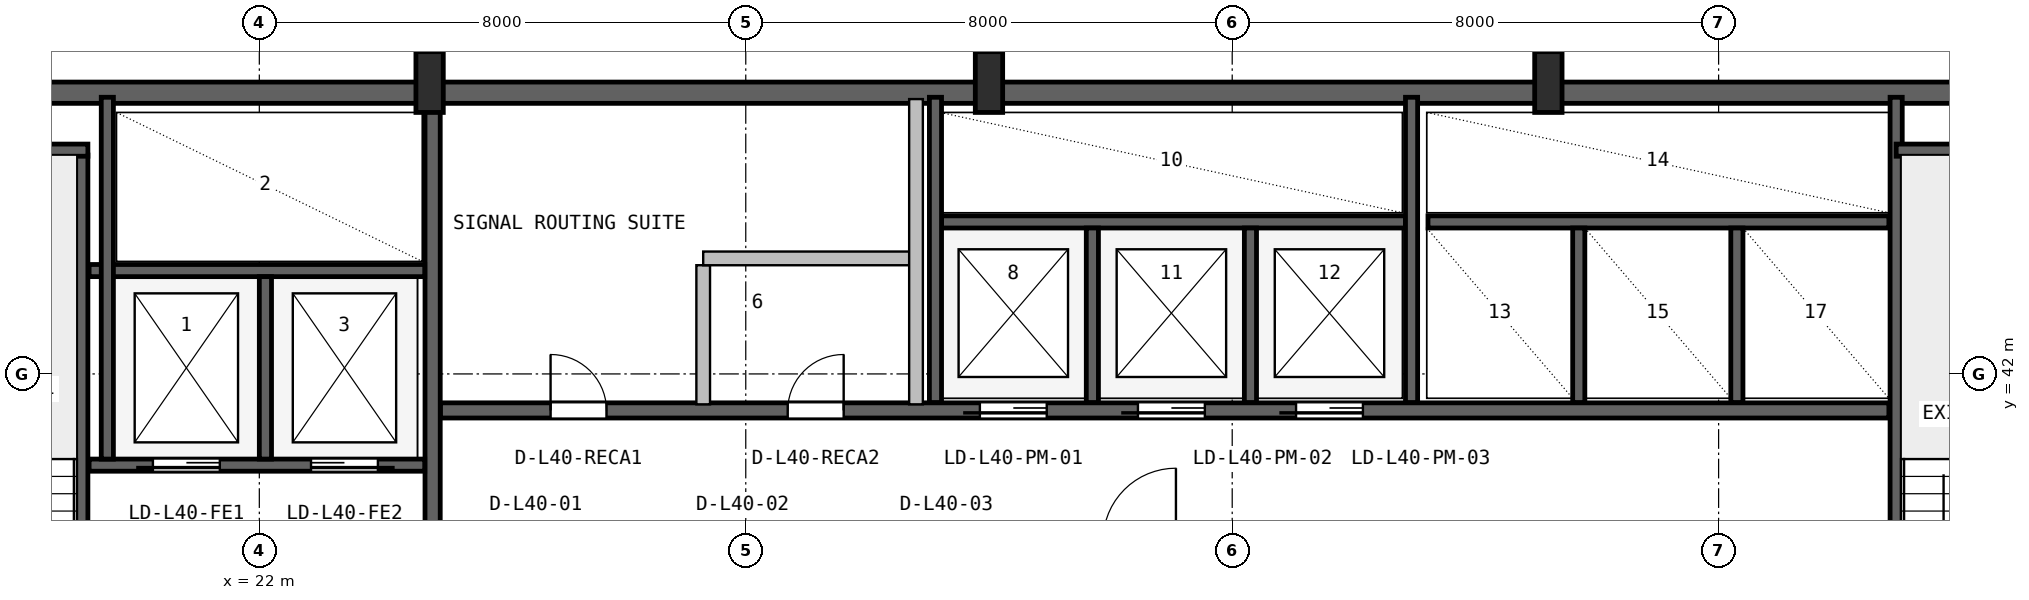
"""IFC4 building model, lengths in metres.
Left out: names, types, materials, properties, quantities, classifications, styles, units other than length and angle.
Written with IfcOpenShell. Run it as: python <this file> out.ifc"""

import sys

from ifc_helpers import new_model, si_unit, direction, frame, frame_2d, origin, origin_2d, place, context, subcontext, project, spatial, rectangle, i_section, extrude, source, transform, mapped, element, fill, save


model = new_model("IFC4")
c1 = context("Model", 3, precision=1e-05, world=origin(), true_north=direction((0.0, 1.0)))
c2 = subcontext(c1, "Body", "Model", "MODEL_VIEW")
j1 = project(units=[si_unit("LENGTHUNIT", "METRE"), si_unit("PLANEANGLEUNIT", "RADIAN")], contexts=[c1])
p1 = place(None, origin())
s1 = spatial("IfcSite", under=j1, at=p1, CompositionType="ELEMENT")
p2 = place(p1, origin())
s2 = spatial("IfcBuilding", under=s1, at=p2, CompositionType="ELEMENT")
p3 = place(p2, frame((0.0, 0.0, 164.8)))
s3 = spatial("IfcBuildingStorey", under=s2, at=p3, CompositionType="ELEMENT", Elevation=164.8)
p4 = place(p3, frame((15.6, 46.625, 0.0), z_axis=(0.0, 0.0, 1.0), x_axis=(1.0, 0.0, 0.0)))
e1 = element("IfcWall", 1, at=p4, inside=s3, PredefinedType="SHEAR", context=c2, shape_type="SweptSolid", body=[
    extrude(rectangle(XDim=36.8, YDim=0.35, at=frame_2d((18.4, 0.0))), origin(), (0.0, 0.0, 1.0), 3.55),
])
m1 = source(origin(), c2, "Body", "SweptSolid", [
    extrude(i_section(OverallWidth=0.45, OverallDepth=1.0, WebThickness=0.016, FlangeThickness=0.03, FilletRadius=0.016, at=origin_2d()), origin(), (0.0, 0.0, 1.0), 3.8),
])
for number, where, z_axis, x_axis in (
    (2, (24.8, 46.8, 0.0), (0.0, 0.0, 1.0), (1.0, 0.0, 0.0)),
    (3, (34.0, 46.8, 0.0), (0.0, 0.0, 1.0), (1.0, 0.0, 0.0)),
    (4, (43.2, 46.8, 0.0), (0.0, 0.0, 1.0), (1.0, 0.0, 0.0)),
):
    element("IfcColumn", number, at=place(p3, frame(where, z_axis=z_axis, x_axis=x_axis)), inside=s3, PredefinedType="COLUMN", context=c2, shape_type="MappedRepresentation", body=[
        mapped(m1, transform((0.0, 0.0, 0.0), x_axis=(1.0, 0.0, 0.0), y_axis=(0.0, 1.0, 0.0), z_axis=(0.0, 0.0, 1.0), scale=1.0)),
    ])
p5 = place(p3, frame((19.08, 35.95, 0.0), z_axis=(0.0, 0.0, 1.0), x_axis=(0.0, 1.0, 0.0)))
e5 = element("IfcWall", 5, at=p5, inside=s3, PredefinedType="SHEAR", context=c2, shape_type="SweptSolid", body=[
    extrude(rectangle(XDim=9.65, YDim=0.2, at=frame_2d((4.825, 0.0))), origin(), (0.0, 0.0, 1.0), 3.55),
])
p6 = place(p5, frame((0.25, 0.0, 0.0)))
e6 = element("IfcOpeningElement", 6, at=p6, cuts=e5, PredefinedType="OPENING", context=c2, shape_type="SweptSolid", body=[
    extrude(rectangle(XDim=0.95, YDim=2.1, at=frame_2d((0.475, 1.05))), frame((0.0, 0.11, 0.0), z_axis=(0.0, -1.0, 0.0), x_axis=(1.0, 0.0, 0.0)), (0.0, 0.0, 1.0), 0.22),
])
p7 = place(p3, frame((15.95, 45.68, 0.0), z_axis=(0.0, 0.0, 1.0), x_axis=(1.0, 0.0, 0.0)))
e7 = element("IfcWall", 7, at=p7, inside=s3, PredefinedType="SHEAR", context=c2, shape_type="SweptSolid", body=[
    extrude(rectangle(XDim=3.23, YDim=0.2, at=frame_2d((1.615, 0.0))), origin(), (0.0, 0.0, 1.0), 3.55),
])
p8 = place(p3, frame((24.85, 36.05, 0.0), z_axis=(0.0, 0.0, 1.0), x_axis=(0.0, 1.0, 0.0)))
e8 = element("IfcWall", 8, at=p8, inside=s3, PredefinedType="SHEAR", context=c2, shape_type="SweptSolid", body=[
    extrude(rectangle(XDim=10.45, YDim=0.25, at=frame_2d((5.225, 0.0))), origin(), (0.0, 0.0, 1.0), 3.55),
])
p9 = place(p3, frame((19.2, 40.5, 0.0), z_axis=(0.0, 0.0, 1.0), x_axis=(1.0, 0.0, 0.0)))
e9 = element("IfcWall", 9, at=p9, inside=s3, PredefinedType="SHEAR", context=c2, shape_type="SweptSolid", body=[
    extrude(rectangle(XDim=5.52, YDim=0.2, at=frame_2d((2.76, 0.0))), origin(), (0.0, 0.0, 1.0), 3.55),
])
p10 = place(p9, frame((1.05, 0.0, 0.0)))
e10 = element("IfcOpeningElement", 10, at=p10, cuts=e9, PredefinedType="OPENING", context=c2, shape_type="SweptSolid", body=[
    extrude(rectangle(XDim=1.1, YDim=2.18, at=frame_2d((0.55, 1.09))), frame((0.0, 0.11, 0.0), z_axis=(0.0, -1.0, 0.0), x_axis=(1.0, 0.0, 0.0)), (0.0, 0.0, 1.0), 0.22),
])
p11 = place(p9, frame((3.65, 0.0, 0.0)))
e11 = element("IfcOpeningElement", 11, at=p11, cuts=e9, PredefinedType="OPENING", context=c2, shape_type="SweptSolid", body=[
    extrude(rectangle(XDim=1.1, YDim=2.18, at=frame_2d((0.55, 1.09))), frame((0.0, 0.11, 0.0), z_axis=(0.0, -1.0, 0.0), x_axis=(1.0, 0.0, 0.0)), (0.0, 0.0, 1.0), 0.22),
])
p12 = place(p3, frame((19.2, 43.7, 0.0), z_axis=(0.0, 0.0, 1.0), x_axis=(1.0, 0.0, 0.0)))
e12 = element("IfcWall", 12, at=p12, inside=s3, PredefinedType="SHEAR", context=c2, shape_type="SweptSolid", body=[
    extrude(rectangle(XDim=5.52, YDim=0.2, at=frame_2d((2.76, 0.0))), origin(), (0.0, 0.0, 1.0), 3.55),
])
p13 = place(p3, frame((22.1, 40.6, 0.0), z_axis=(0.0, 0.0, 1.0), x_axis=(0.0, 1.0, 0.0)))
e13 = element("IfcWall", 13, at=p13, inside=s3, PredefinedType="SHEAR", context=c2, shape_type="SweptSolid", body=[
    extrude(rectangle(XDim=3.0, YDim=0.2, at=frame_2d((1.5, 0.0))), origin(), (0.0, 0.0, 1.0), 3.55),
])
p14 = place(p3, frame((19.5, 40.6, 0.0), z_axis=(0.0, 0.0, 1.0), x_axis=(0.0, 1.0, 0.0)))
e14 = element("IfcWall", 14, at=p14, inside=s3, PredefinedType="SHEAR", context=c2, shape_type="SweptSolid", body=[
    extrude(rectangle(XDim=5.95, YDim=0.2, at=frame_2d((2.975, 0.0))), origin(), (0.0, 0.0, 1.0), 3.55),
])
p15 = place(p3, frame((48.92, 36.05, 0.0), z_axis=(0.0, 0.0, 1.0), x_axis=(0.0, 1.0, 0.0)))
e15 = element("IfcWall", 15, at=p15, inside=s3, PredefinedType="SHEAR", context=c2, shape_type="SweptSolid", body=[
    extrude(rectangle(XDim=10.5, YDim=0.2, at=frame_2d((5.25, 0.0))), origin(), (0.0, 0.0, 1.0), 3.55),
])
p16 = place(p3, frame((48.92, 45.68, 0.0), z_axis=(0.0, 0.0, 1.0), x_axis=(1.0, 0.0, 0.0)))
e16 = element("IfcWall", 16, at=p16, inside=s3, PredefinedType="SHEAR", context=c2, shape_type="SweptSolid", body=[
    extrude(rectangle(XDim=3.18, YDim=0.2, at=frame_2d((1.59, 0.0))), origin(), (0.0, 0.0, 1.0), 3.55),
])
p17 = place(p3, frame((24.98, 41.4, 0.0), z_axis=(0.0, 0.0, 1.0), x_axis=(1.0, 0.0, 0.0)))
e17 = element("IfcWall", 17, at=p17, inside=s3, PredefinedType="SHEAR", context=c2, shape_type="SweptSolid", body=[
    extrude(rectangle(XDim=23.82, YDim=0.25, at=frame_2d((11.91, 0.0))), origin(), (0.0, 0.0, 1.0), 3.55),
])
p18 = place(p17, frame((8.87, 0.0, 0.0)))
e18 = element("IfcOpeningElement", 18, at=p18, cuts=e17, PredefinedType="OPENING", context=c2, shape_type="SweptSolid", body=[
    extrude(rectangle(XDim=1.1, YDim=2.18, at=frame_2d((0.55, 1.09))), frame((0.0, 0.135, 0.0), z_axis=(0.0, -1.0, 0.0), x_axis=(1.0, 0.0, 0.0)), (0.0, 0.0, 1.0), 0.27),
])
p19 = place(p17, frame((11.47, 0.0, 0.0)))
e19 = element("IfcOpeningElement", 19, at=p19, cuts=e17, PredefinedType="OPENING", context=c2, shape_type="SweptSolid", body=[
    extrude(rectangle(XDim=1.1, YDim=2.18, at=frame_2d((0.55, 1.09))), frame((0.0, 0.135, 0.0), z_axis=(0.0, -1.0, 0.0), x_axis=(1.0, 0.0, 0.0)), (0.0, 0.0, 1.0), 0.27),
])
p20 = place(p17, frame((14.07, 0.0, 0.0)))
e20 = element("IfcOpeningElement", 20, at=p20, cuts=e17, PredefinedType="OPENING", context=c2, shape_type="SweptSolid", body=[
    extrude(rectangle(XDim=1.1, YDim=2.18, at=frame_2d((0.55, 1.09))), frame((0.0, 0.135, 0.0), z_axis=(0.0, -1.0, 0.0), x_axis=(1.0, 0.0, 0.0)), (0.0, 0.0, 1.0), 0.27),
])
p21 = place(p17, frame((1.81, 0.0, 0.0)))
e21 = element("IfcOpeningElement", 21, at=p21, cuts=e17, PredefinedType="OPENING", context=c2, shape_type="SweptSolid", body=[
    extrude(rectangle(XDim=0.92, YDim=2.08, at=frame_2d((0.46, 1.04))), frame((0.0, 0.135, 0.0), z_axis=(0.0, -1.0, 0.0), x_axis=(1.0, 0.0, 0.0)), (0.0, 0.0, 1.0), 0.27),
])
p22 = place(p17, frame((5.71, 0.0, 0.0)))
e22 = element("IfcOpeningElement", 22, at=p22, cuts=e17, PredefinedType="OPENING", context=c2, shape_type="SweptSolid", body=[
    extrude(rectangle(XDim=0.92, YDim=2.08, at=frame_2d((0.46, 1.04))), frame((0.0, 0.135, 0.0), z_axis=(0.0, -1.0, 0.0), x_axis=(1.0, 0.0, 0.0)), (0.0, 0.0, 1.0), 0.27),
])
p23 = place(p3, frame((33.22, 44.5, 0.0), z_axis=(0.0, 0.0, 1.0), x_axis=(1.0, 0.0, 0.0)))
e23 = element("IfcWall", 23, at=p23, inside=s3, PredefinedType="SHEAR", context=c2, shape_type="SweptSolid", body=[
    extrude(rectangle(XDim=7.63, YDim=0.2, at=frame_2d((3.815, 0.0))), origin(), (0.0, 0.0, 1.0), 3.55),
])
p24 = place(p3, frame((33.12, 41.53, 0.0), z_axis=(0.0, 0.0, 1.0), x_axis=(0.0, 1.0, 0.0)))
e24 = element("IfcWall", 24, at=p24, inside=s3, PredefinedType="SHEAR", context=c2, shape_type="SweptSolid", body=[
    extrude(rectangle(XDim=5.02, YDim=0.2, at=frame_2d((2.51, 0.0))), origin(), (0.0, 0.0, 1.0), 3.55),
])
for number, where, z_axis, x_axis in (
    (25, (35.7, 41.53, 0.0), (0.0, 0.0, 1.0), (0.0, 1.0, 0.0)),
    (26, (38.3, 41.53, 0.0), (0.0, 0.0, 1.0), (0.0, 1.0, 0.0)),
):
    element("IfcWall", number, at=place(p3, frame(where, z_axis=z_axis, x_axis=x_axis)), inside=s3, PredefinedType="SHEAR", context=c2, shape_type="SweptSolid", body=[
        extrude(rectangle(XDim=2.87, YDim=0.2, at=frame_2d((1.435, 0.0))), origin(), (0.0, 0.0, 1.0), 3.55),
    ])
p25 = place(p3, frame((40.95, 41.53, 0.0), z_axis=(0.0, 0.0, 1.0), x_axis=(0.0, 1.0, 0.0)))
e27 = element("IfcWall", 27, at=p25, inside=s3, PredefinedType="SHEAR", context=c2, shape_type="SweptSolid", body=[
    extrude(rectangle(XDim=5.02, YDim=0.2, at=frame_2d((2.51, 0.0))), origin(), (0.0, 0.0, 1.0), 3.55),
])
p26 = place(p3, frame((41.22, 44.5, 0.0), z_axis=(0.0, 0.0, 1.0), x_axis=(1.0, 0.0, 0.0)))
e28 = element("IfcWall", 28, at=p26, inside=s3, PredefinedType="SHEAR", context=c2, shape_type="SweptSolid", body=[
    extrude(rectangle(XDim=7.58, YDim=0.2, at=frame_2d((3.79, 0.0))), origin(), (0.0, 0.0, 1.0), 3.55),
])
for number, where, z_axis, x_axis in (
    (29, (43.7, 41.53, 0.0), (0.0, 0.0, 1.0), (0.0, 1.0, 0.0)),
    (30, (46.3, 41.53, 0.0), (0.0, 0.0, 1.0), (0.0, 1.0, 0.0)),
):
    element("IfcWall", number, at=place(p3, frame(where, z_axis=z_axis, x_axis=x_axis)), inside=s3, PredefinedType="SHEAR", context=c2, shape_type="SweptSolid", body=[
        extrude(rectangle(XDim=2.87, YDim=0.2, at=frame_2d((1.435, 0.0))), origin(), (0.0, 0.0, 1.0), 3.55),
    ])
p27 = place(p3, frame((29.3, 41.5, 0.0), z_axis=(0.0, 0.0, 1.0), x_axis=(0.0, 1.0, 0.0)))
e31 = element("IfcWall", 31, at=p27, inside=s3, PredefinedType="PARTITIONING", context=c2, shape_type="SweptSolid", body=[
    extrude(rectangle(XDim=2.288, YDim=0.225, at=frame_2d((1.144, 0.0))), origin(), (0.0, 0.0, 1.0), 3.53),
])
p28 = place(p3, frame((29.3, 43.9, 0.0), z_axis=(0.0, 0.0, 1.0), x_axis=(1.0, 0.0, 0.0)))
e32 = element("IfcWall", 32, at=p28, inside=s3, PredefinedType="PARTITIONING", context=c2, shape_type="SweptSolid", body=[
    extrude(rectangle(XDim=3.5, YDim=0.225, at=frame_2d((1.75, 0.0))), origin(), (0.0, 0.0, 1.0), 3.53),
])
p29 = place(p3, frame((32.8, 41.5, 0.0), z_axis=(0.0, 0.0, 1.0), x_axis=(0.0, 1.0, 0.0)))
e33 = element("IfcWall", 33, at=p29, inside=s3, PredefinedType="PARTITIONING", context=c2, shape_type="SweptSolid", body=[
    extrude(rectangle(XDim=5.02, YDim=0.225, at=frame_2d((2.51, 0.0))), origin(), (0.0, 0.0, 1.0), 3.53),
])
m2 = source(origin(), c2, "Body", "SweptSolid", [
    extrude(rectangle(XDim=1.1, YDim=2.18, at=frame_2d((0.55, 1.09))), frame((0.0, 0.025, 0.0), z_axis=(0.0, -1.0, 0.0), x_axis=(1.0, 0.0, 0.0)), (0.0, 0.0, 1.0), 0.05),
])
p30 = place(p10, frame((1.1, 0.0, 0.0), z_axis=(0.0, 0.0, 1.0), x_axis=(-1.0, 0.0, 0.0)))
e34 = element("IfcDoor", 34, at=p30, inside=s3, OperationType="SLIDING_TO_LEFT", PredefinedType="DOOR", context=c2, shape_type="MappedRepresentation", body=[
    mapped(m2, transform((0.0, 0.0, 0.0), x_axis=(1.0, 0.0, 0.0), y_axis=(0.0, 1.0, 0.0), z_axis=(0.0, 0.0, 1.0), scale=1.0)),
])
fill(e10, e34)
p31 = place(p11, frame((1.1, 0.0, 0.0), z_axis=(0.0, 0.0, 1.0), x_axis=(-1.0, 0.0, 0.0)))
e35 = element("IfcDoor", 35, at=p31, inside=s3, OperationType="SLIDING_TO_RIGHT", PredefinedType="DOOR", context=c2, shape_type="MappedRepresentation", body=[
    mapped(m2, transform((0.0, 0.0, 0.0), x_axis=(1.0, 0.0, 0.0), y_axis=(0.0, 1.0, 0.0), z_axis=(0.0, 0.0, 1.0), scale=1.0)),
])
fill(e11, e35)
p32 = place(p18, frame((1.1, 0.0, 0.0), z_axis=(0.0, 0.0, 1.0), x_axis=(-1.0, 0.0, 0.0)))
e36 = element("IfcDoor", 36, at=p32, inside=s3, OperationType="SLIDING_TO_LEFT", PredefinedType="DOOR", context=c2, shape_type="MappedRepresentation", body=[
    mapped(m2, transform((0.0, 0.0, 0.0), x_axis=(1.0, 0.0, 0.0), y_axis=(0.0, 1.0, 0.0), z_axis=(0.0, 0.0, 1.0), scale=1.0)),
])
fill(e18, e36)
p33 = place(p19, frame((1.1, 0.0, 0.0), z_axis=(0.0, 0.0, 1.0), x_axis=(-1.0, 0.0, 0.0)))
e37 = element("IfcDoor", 37, at=p33, inside=s3, OperationType="SLIDING_TO_LEFT", PredefinedType="DOOR", context=c2, shape_type="MappedRepresentation", body=[
    mapped(m2, transform((0.0, 0.0, 0.0), x_axis=(1.0, 0.0, 0.0), y_axis=(0.0, 1.0, 0.0), z_axis=(0.0, 0.0, 1.0), scale=1.0)),
])
fill(e19, e37)
p34 = place(p20, frame((1.1, 0.0, 0.0), z_axis=(0.0, 0.0, 1.0), x_axis=(-1.0, 0.0, 0.0)))
e38 = element("IfcDoor", 38, at=p34, inside=s3, OperationType="SLIDING_TO_LEFT", PredefinedType="DOOR", context=c2, shape_type="MappedRepresentation", body=[
    mapped(m2, transform((0.0, 0.0, 0.0), x_axis=(1.0, 0.0, 0.0), y_axis=(0.0, 1.0, 0.0), z_axis=(0.0, 0.0, 1.0), scale=1.0)),
])
fill(e20, e38)
m3 = source(origin(), c2, "Body", "SweptSolid", [
    extrude(rectangle(XDim=0.92, YDim=2.08, at=frame_2d((0.46, 1.04))), frame((0.0, 0.025, 0.0), z_axis=(0.0, -1.0, 0.0), x_axis=(1.0, 0.0, 0.0)), (0.0, 0.0, 1.0), 0.05),
])
p35 = place(p21, origin())
e39 = element("IfcDoor", 39, at=p35, inside=s3, OperationType="SINGLE_SWING_LEFT", PredefinedType="DOOR", context=c2, shape_type="MappedRepresentation", body=[
    mapped(m3, transform((0.0, 0.0, 0.0), x_axis=(1.0, 0.0, 0.0), y_axis=(0.0, 1.0, 0.0), z_axis=(0.0, 0.0, 1.0), scale=1.0)),
])
fill(e21, e39)
p36 = place(p22, origin())
e40 = element("IfcDoor", 40, at=p36, inside=s3, OperationType="SINGLE_SWING_RIGHT", PredefinedType="DOOR", context=c2, shape_type="MappedRepresentation", body=[
    mapped(m3, transform((0.0, 0.0, 0.0), x_axis=(1.0, 0.0, 0.0), y_axis=(0.0, 1.0, 0.0), z_axis=(0.0, 0.0, 1.0), scale=1.0)),
])
fill(e22, e40)
save(model, sys.argv[1])
